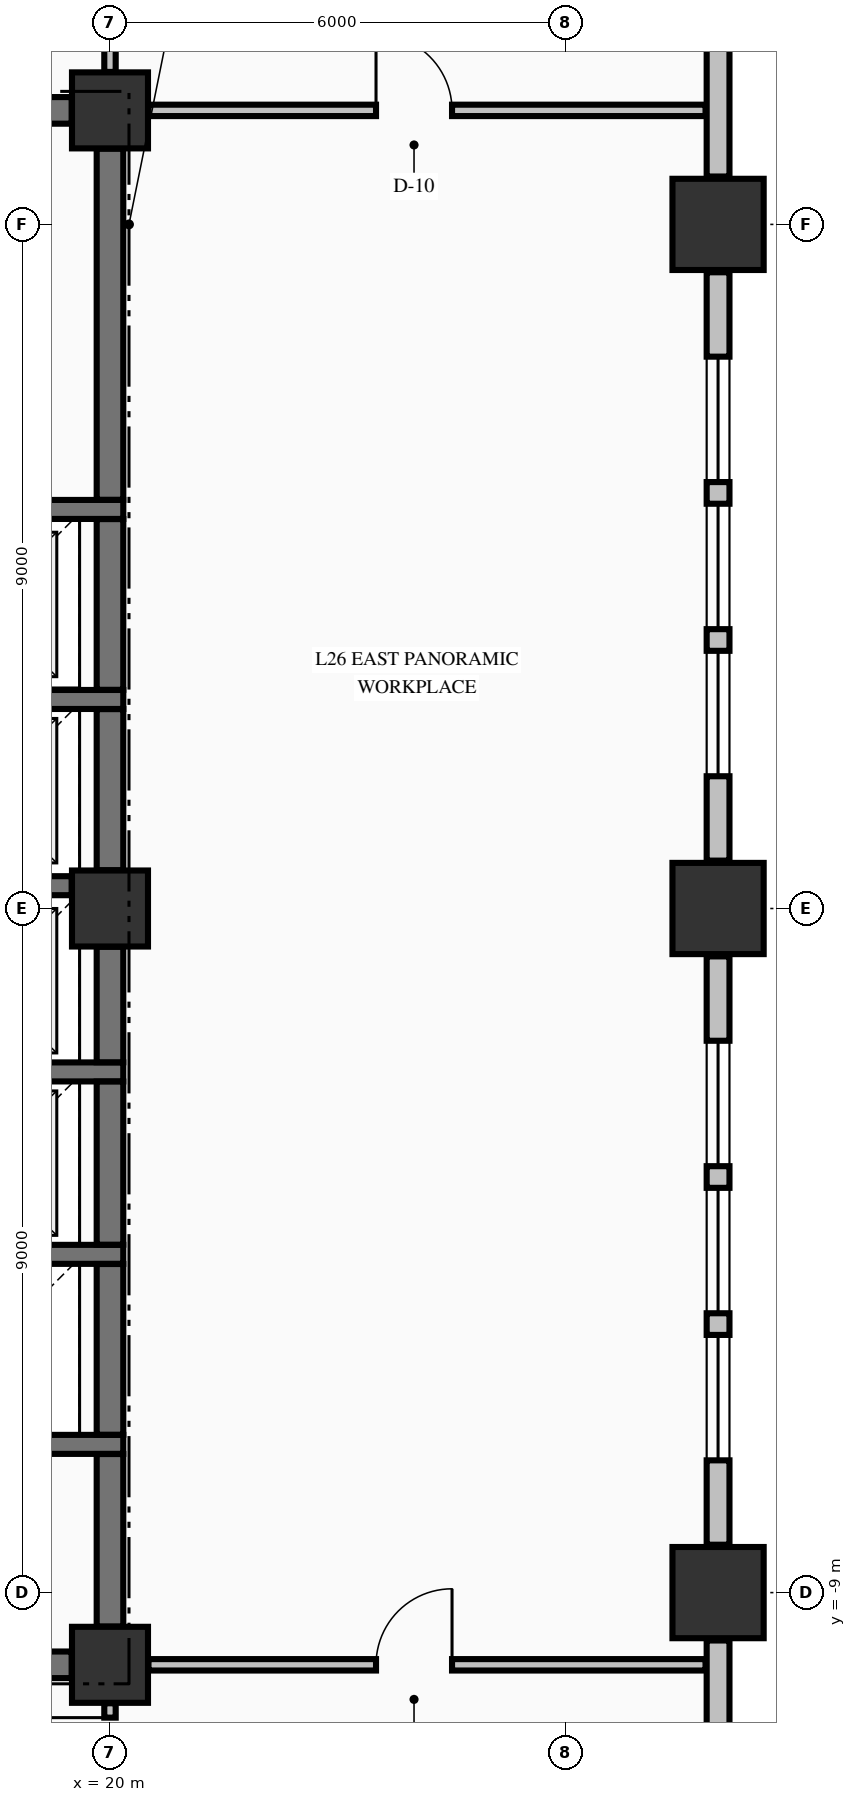
"""IFC4 building model, lengths in metres.
Left out: names, types, materials, properties, quantities, classifications, styles, units other than length and angle.
Written with IfcOpenShell. Run it as: python <this file> out.ifc"""

import sys

from ifc_helpers import new_model, si_unit, direction, frame, frame_2d, origin, origin_2d, place, context, subcontext, project, spatial, rectangle, extrude, element, fill, save


model = new_model("IFC4")
c1 = context("Model", 3, precision=1e-05, world=origin(), true_north=direction((0.0, 1.0)))
c2 = subcontext(c1, "Body", "Model", "MODEL_VIEW")
j1 = project(units=[si_unit("LENGTHUNIT", "METRE"), si_unit("PLANEANGLEUNIT", "RADIAN")], contexts=[c1])
p1 = place(None, origin())
s1 = spatial("IfcSite", under=j1, at=p1, CompositionType="ELEMENT")
p2 = place(p1, origin())
s2 = spatial("IfcBuilding", under=s1, at=p2, CompositionType="ELEMENT")
p3 = place(p2, frame((0.0, 0.0, 105.64)))
s3 = spatial("IfcBuildingStorey", under=s2, at=p3, CompositionType="ELEMENT", Elevation=105.64)
for number, where, z_axis, x_axis in (
    (1, (28.0, -9.0, -0.25), (0.0, 0.0, 1.0), (1.0, 0.0, 0.0)),
    (2, (28.0, 0.0, -0.25), (0.0, 0.0, 1.0), (1.0, 0.0, 0.0)),
    (3, (28.0, 9.0, -0.25), (0.0, 0.0, 1.0), (1.0, 0.0, 0.0)),
):
    element("IfcColumn", number, at=place(p3, frame(where, z_axis=z_axis, x_axis=x_axis)), inside=s3, PredefinedType="COLUMN", context=c2, shape_type="SweptSolid", body=[
        extrude(rectangle(XDim=1.2, YDim=1.2, at=origin_2d()), origin(), (0.0, 0.0, 1.0), 3.57),
    ])
for number, where, z_axis, x_axis in (
    (4, (20.0, -9.95, -0.25), (0.0, 0.0, 1.0), (1.0, 0.0, 0.0)),
    (5, (20.0, 10.5, -0.25), (0.0, 0.0, 1.0), (1.0, 0.0, 0.0)),
    (6, (20.0, 0.0, -0.25), (0.0, 0.0, 1.0), (1.0, 0.0, 0.0)),
):
    element("IfcColumn", number, at=place(p3, frame(where, z_axis=z_axis, x_axis=x_axis)), inside=s3, PredefinedType="COLUMN", context=c2, shape_type="SweptSolid", body=[
        extrude(rectangle(XDim=1.0, YDim=1.0, at=origin_2d()), origin(), (0.0, 0.0, 1.0), 3.57),
    ])
p4 = place(p3, frame((28.0, -20.37, 0.0), z_axis=(0.0, 0.0, 1.0), x_axis=(0.0, 1.0, 0.0)))
e7 = element("IfcWall", 7, at=p4, inside=s3, PredefinedType="STANDARD", context=c2, shape_type="SweptSolid", body=[
    extrude(rectangle(XDim=10.74, YDim=0.3, at=frame_2d((5.37, 0.0))), origin(), (0.0, 0.0, 1.0), 2.712),
])
p5 = place(p3, frame((28.0, -8.37, 0.0), z_axis=(0.0, 0.0, 1.0), x_axis=(0.0, 1.0, 0.0)))
e8 = element("IfcWall", 8, at=p5, inside=s3, PredefinedType="STANDARD", context=c2, shape_type="SweptSolid", body=[
    extrude(rectangle(XDim=7.74, YDim=0.3, at=frame_2d((3.87, 0.0))), origin(), (0.0, 0.0, 1.0), 2.712),
])
p6 = place(p5, frame((1.11, 0.0, 0.8)))
e9 = element("IfcOpeningElement", 9, at=p6, cuts=e8, PredefinedType="OPENING", context=c2, shape_type="SweptSolid", body=[
    extrude(rectangle(XDim=1.65, YDim=1.7, at=frame_2d((0.825, 0.85))), frame((0.0, 0.16, 0.0), z_axis=(0.0, -1.0, 0.0), x_axis=(1.0, 0.0, 0.0)), (0.0, 0.0, 1.0), 0.32),
])
p7 = place(p5, frame((3.045, 0.0, 0.8)))
e10 = element("IfcOpeningElement", 10, at=p7, cuts=e8, PredefinedType="OPENING", context=c2, shape_type="SweptSolid", body=[
    extrude(rectangle(XDim=1.65, YDim=1.7, at=frame_2d((0.825, 0.85))), frame((0.0, 0.16, 0.0), z_axis=(0.0, -1.0, 0.0), x_axis=(1.0, 0.0, 0.0)), (0.0, 0.0, 1.0), 0.32),
])
p8 = place(p5, frame((4.98, 0.0, 0.8)))
e11 = element("IfcOpeningElement", 11, at=p8, cuts=e8, PredefinedType="OPENING", context=c2, shape_type="SweptSolid", body=[
    extrude(rectangle(XDim=1.65, YDim=1.7, at=frame_2d((0.825, 0.85))), frame((0.0, 0.16, 0.0), z_axis=(0.0, -1.0, 0.0), x_axis=(1.0, 0.0, 0.0)), (0.0, 0.0, 1.0), 0.32),
])
p9 = place(p3, frame((28.0, 0.63, 0.0), z_axis=(0.0, 0.0, 1.0), x_axis=(0.0, 1.0, 0.0)))
e12 = element("IfcWall", 12, at=p9, inside=s3, PredefinedType="STANDARD", context=c2, shape_type="SweptSolid", body=[
    extrude(rectangle(XDim=7.74, YDim=0.3, at=frame_2d((3.87, 0.0))), origin(), (0.0, 0.0, 1.0), 2.712),
])
p10 = place(p9, frame((1.11, 0.0, 0.8)))
e13 = element("IfcOpeningElement", 13, at=p10, cuts=e12, PredefinedType="OPENING", context=c2, shape_type="SweptSolid", body=[
    extrude(rectangle(XDim=1.65, YDim=1.7, at=frame_2d((0.825, 0.85))), frame((0.0, 0.16, 0.0), z_axis=(0.0, -1.0, 0.0), x_axis=(1.0, 0.0, 0.0)), (0.0, 0.0, 1.0), 0.32),
])
p11 = place(p9, frame((3.045, 0.0, 0.8)))
e14 = element("IfcOpeningElement", 14, at=p11, cuts=e12, PredefinedType="OPENING", context=c2, shape_type="SweptSolid", body=[
    extrude(rectangle(XDim=1.65, YDim=1.7, at=frame_2d((0.825, 0.85))), frame((0.0, 0.16, 0.0), z_axis=(0.0, -1.0, 0.0), x_axis=(1.0, 0.0, 0.0)), (0.0, 0.0, 1.0), 0.32),
])
p12 = place(p9, frame((4.98, 0.0, 0.8)))
e15 = element("IfcOpeningElement", 15, at=p12, cuts=e12, PredefinedType="OPENING", context=c2, shape_type="SweptSolid", body=[
    extrude(rectangle(XDim=1.65, YDim=1.7, at=frame_2d((0.825, 0.85))), frame((0.0, 0.16, 0.0), z_axis=(0.0, -1.0, 0.0), x_axis=(1.0, 0.0, 0.0)), (0.0, 0.0, 1.0), 0.32),
])
p13 = place(p3, frame((28.0, 9.63, 0.0), z_axis=(0.0, 0.0, 1.0), x_axis=(0.0, 1.0, 0.0)))
e16 = element("IfcWall", 16, at=p13, inside=s3, PredefinedType="STANDARD", context=c2, shape_type="SweptSolid", body=[
    extrude(rectangle(XDim=10.74, YDim=0.3, at=frame_2d((5.37, 0.0))), origin(), (0.0, 0.0, 1.0), 2.712),
])
p14 = place(p3, frame((14.7, -9.95, 0.0), z_axis=(0.0, 0.0, 1.0), x_axis=(1.0, 0.0, 0.0)))
e17 = element("IfcWall", 17, at=p14, inside=s3, PredefinedType="SHEAR", context=c2, shape_type="SweptSolid", body=[
    extrude(rectangle(XDim=4.796, YDim=0.35, at=frame_2d((2.398, 0.0))), origin(), (0.0, 0.0, 1.0), 3.32),
])
p15 = place(p14, frame((0.65, 0.0, 0.0)))
e18 = element("IfcOpeningElement", 18, at=p15, cuts=e17, PredefinedType="OPENING", context=c2, shape_type="SweptSolid", body=[
    extrude(rectangle(XDim=1.2, YDim=2.15, at=frame_2d((0.6, 1.075))), frame((0.0, 0.185, 0.0), z_axis=(0.0, -1.0, 0.0), x_axis=(1.0, 0.0, 0.0)), (0.0, 0.0, 1.0), 0.37),
])
for number, where, z_axis, x_axis in (
    (19, (17.025, -7.05, 0.0), (0.0, 0.0, 1.0), (1.0, 0.0, 0.0)),
    (20, (17.025, -4.55, 0.0), (0.0, 0.0, 1.0), (1.0, 0.0, 0.0)),
    (21, (17.025, -2.15, 0.0), (0.0, 0.0, 1.0), (1.0, 0.0, 0.0)),
):
    element("IfcWall", number, at=place(p3, frame(where, z_axis=z_axis, x_axis=x_axis)), inside=s3, PredefinedType="SOLIDWALL", context=c2, shape_type="SweptSolid", body=[
        extrude(rectangle(XDim=3.15, YDim=0.25, at=frame_2d((1.575, 0.0))), origin(), (0.0, 0.0, 1.0), 3.32),
    ])
p16 = place(p3, frame((17.025, 0.3, 0.0), z_axis=(0.0, 0.0, 1.0), x_axis=(1.0, 0.0, 0.0)))
e22 = element("IfcWall", 22, at=p16, inside=s3, PredefinedType="SOLIDWALL", context=c2, shape_type="SweptSolid", body=[
    extrude(rectangle(XDim=2.471, YDim=0.25, at=frame_2d((1.236, 0.0))), origin(), (0.0, 0.0, 1.0), 3.32),
])
for number, where, z_axis, x_axis in (
    (23, (17.025, 2.75, 0.0), (0.0, 0.0, 1.0), (1.0, 0.0, 0.0)),
    (24, (17.025, 5.25, 0.0), (0.0, 0.0, 1.0), (1.0, 0.0, 0.0)),
):
    element("IfcWall", number, at=place(p3, frame(where, z_axis=z_axis, x_axis=x_axis)), inside=s3, PredefinedType="SOLIDWALL", context=c2, shape_type="SweptSolid", body=[
        extrude(rectangle(XDim=3.15, YDim=0.25, at=frame_2d((1.575, 0.0))), origin(), (0.0, 0.0, 1.0), 3.32),
    ])
p17 = place(p3, frame((14.7, 10.5, 0.0), z_axis=(0.0, 0.0, 1.0), x_axis=(1.0, 0.0, 0.0)))
e25 = element("IfcWall", 25, at=p17, inside=s3, PredefinedType="SHEAR", context=c2, shape_type="SweptSolid", body=[
    extrude(rectangle(XDim=4.796, YDim=0.35, at=frame_2d((2.398, 0.0))), origin(), (0.0, 0.0, 1.0), 3.32),
])
p18 = place(p17, frame((0.65, 0.0, 0.0)))
e26 = element("IfcOpeningElement", 26, at=p18, cuts=e25, PredefinedType="OPENING", context=c2, shape_type="SweptSolid", body=[
    extrude(rectangle(XDim=1.2, YDim=2.15, at=frame_2d((0.6, 1.075))), frame((0.0, 0.185, 0.0), z_axis=(0.0, -1.0, 0.0), x_axis=(1.0, 0.0, 0.0)), (0.0, 0.0, 1.0), 0.37),
])
p19 = place(p17, frame((3.25, 0.0, 0.0)))
e27 = element("IfcOpeningElement", 27, at=p19, cuts=e25, PredefinedType="OPENING", context=c2, shape_type="SweptSolid", body=[
    extrude(rectangle(XDim=0.9, YDim=2.15, at=frame_2d((0.45, 1.075))), frame((0.0, 0.185, 0.0), z_axis=(0.0, -1.0, 0.0), x_axis=(1.0, 0.0, 0.0)), (0.0, 0.0, 1.0), 0.37),
])
p20 = place(p3, frame((20.506, -9.95, 0.0), z_axis=(0.0, 0.0, 1.0), x_axis=(1.0, 0.0, 0.0)))
e28 = element("IfcWall", 28, at=p20, inside=s3, PredefinedType="PARTITIONING", context=c2, shape_type="SweptSolid", body=[
    extrude(rectangle(XDim=7.329, YDim=0.15, at=frame_2d((3.665, 0.0))), origin(), (0.0, 0.0, 1.0), 3.32),
])
p21 = place(p20, frame((2.994, 0.0, 0.0)))
e29 = element("IfcOpeningElement", 29, at=p21, cuts=e28, PredefinedType="OPENING", context=c2, shape_type="SweptSolid", body=[
    extrude(rectangle(XDim=1.0, YDim=2.15, at=frame_2d((0.5, 1.075))), frame((0.0, 0.085, 0.0), z_axis=(0.0, -1.0, 0.0), x_axis=(1.0, 0.0, 0.0)), (0.0, 0.0, 1.0), 0.17),
])
p22 = place(p3, frame((20.506, 10.5, 0.0), z_axis=(0.0, 0.0, 1.0), x_axis=(1.0, 0.0, 0.0)))
e30 = element("IfcWall", 30, at=p22, inside=s3, PredefinedType="PARTITIONING", context=c2, shape_type="SweptSolid", body=[
    extrude(rectangle(XDim=7.329, YDim=0.15, at=frame_2d((3.665, 0.0))), origin(), (0.0, 0.0, 1.0), 3.32),
])
p23 = place(p22, frame((2.994, 0.0, 0.0)))
e31 = element("IfcOpeningElement", 31, at=p23, cuts=e30, PredefinedType="OPENING", context=c2, shape_type="SweptSolid", body=[
    extrude(rectangle(XDim=1.0, YDim=2.15, at=frame_2d((0.5, 1.075))), frame((0.0, 0.085, 0.0), z_axis=(0.0, -1.0, 0.0), x_axis=(1.0, 0.0, 0.0)), (0.0, 0.0, 1.0), 0.17),
])
p24 = place(p3, frame((20.0, -9.446, 0.0), z_axis=(0.0, 0.0, 1.0), x_axis=(0.0, 1.0, 0.0)))
e32 = element("IfcWall", 32, at=p24, inside=s3, PredefinedType="SHEAR", context=c2, shape_type="SweptSolid", body=[
    extrude(rectangle(XDim=2.269, YDim=0.35, at=frame_2d((1.135, 0.0))), origin(), (0.0, 0.0, 1.0), 3.32),
])
p25 = place(p3, frame((20.0, -6.923, 0.0), z_axis=(0.0, 0.0, 1.0), x_axis=(0.0, 1.0, 0.0)))
e33 = element("IfcWall", 33, at=p25, inside=s3, PredefinedType="SHEAR", context=c2, shape_type="SweptSolid", body=[
    extrude(rectangle(XDim=2.246, YDim=0.35, at=frame_2d((1.123, 0.0))), origin(), (0.0, 0.0, 1.0), 3.32),
])
p26 = place(p3, frame((20.0, -4.423, 0.0), z_axis=(0.0, 0.0, 1.0), x_axis=(0.0, 1.0, 0.0)))
e34 = element("IfcWall", 34, at=p26, inside=s3, PredefinedType="SHEAR", context=c2, shape_type="SweptSolid", body=[
    extrude(rectangle(XDim=2.146, YDim=0.35, at=frame_2d((1.073, 0.0))), origin(), (0.0, 0.0, 1.0), 3.32),
])
p27 = place(p3, frame((20.0, -2.023, 0.0), z_axis=(0.0, 0.0, 1.0), x_axis=(0.0, 1.0, 0.0)))
e35 = element("IfcWall", 35, at=p27, inside=s3, PredefinedType="SHEAR", context=c2, shape_type="SweptSolid", body=[
    extrude(rectangle(XDim=1.519, YDim=0.35, at=frame_2d((0.76, 0.0))), origin(), (0.0, 0.0, 1.0), 3.32),
])
p28 = place(p3, frame((20.0, 0.504, 0.0), z_axis=(0.0, 0.0, 1.0), x_axis=(0.0, 1.0, 0.0)))
e36 = element("IfcWall", 36, at=p28, inside=s3, PredefinedType="SHEAR", context=c2, shape_type="SweptSolid", body=[
    extrude(rectangle(XDim=2.119, YDim=0.35, at=frame_2d((1.06, 0.0))), origin(), (0.0, 0.0, 1.0), 3.32),
])
p29 = place(p3, frame((20.0, 2.877, 0.0), z_axis=(0.0, 0.0, 1.0), x_axis=(0.0, 1.0, 0.0)))
e37 = element("IfcWall", 37, at=p29, inside=s3, PredefinedType="SHEAR", context=c2, shape_type="SweptSolid", body=[
    extrude(rectangle(XDim=2.246, YDim=0.35, at=frame_2d((1.123, 0.0))), origin(), (0.0, 0.0, 1.0), 3.32),
])
p30 = place(p3, frame((20.0, 5.377, 0.0), z_axis=(0.0, 0.0, 1.0), x_axis=(0.0, 1.0, 0.0)))
e38 = element("IfcWall", 38, at=p30, inside=s3, PredefinedType="SHEAR", context=c2, shape_type="SweptSolid", body=[
    extrude(rectangle(XDim=4.619, YDim=0.35, at=frame_2d((2.31, 0.0))), origin(), (0.0, 0.0, 1.0), 3.32),
])
p31 = place(p3, frame((20.0, -12.222, 0.0), z_axis=(0.0, 0.0, 1.0), x_axis=(0.0, 1.0, 0.0)))
e39 = element("IfcWall", 39, at=p31, inside=s3, PredefinedType="PARTITIONING", context=c2, shape_type="SweptSolid", body=[
    extrude(rectangle(XDim=1.766, YDim=0.15, at=frame_2d((0.883, 0.0))), origin(), (0.0, 0.0, 1.0), 2.81),
])
p32 = place(p31, frame((0.627, 0.0, 0.0)))
e40 = element("IfcOpeningElement", 40, at=p32, cuts=e39, PredefinedType="OPENING", context=c2, shape_type="SweptSolid", body=[
    extrude(rectangle(XDim=0.95, YDim=2.15, at=frame_2d((0.475, 1.075))), frame((0.0, 0.085, 0.0), z_axis=(0.0, -1.0, 0.0), x_axis=(1.0, 0.0, 0.0)), (0.0, 0.0, 1.0), 0.17),
])
p33 = place(p3, frame((20.0, 11.006, 0.0), z_axis=(0.0, 0.0, 1.0), x_axis=(0.0, 1.0, 0.0)))
e41 = element("IfcWall", 41, at=p33, inside=s3, PredefinedType="PARTITIONING", context=c2, shape_type="SweptSolid", body=[
    extrude(rectangle(XDim=2.066, YDim=0.15, at=frame_2d((1.033, 0.0))), origin(), (0.0, 0.0, 1.0), 2.81),
])
p34 = place(p33, frame((0.339, 0.0, 0.0)))
e42 = element("IfcOpeningElement", 42, at=p34, cuts=e41, PredefinedType="OPENING", context=c2, shape_type="SweptSolid", body=[
    extrude(rectangle(XDim=0.95, YDim=2.15, at=frame_2d((0.475, 1.075))), frame((0.0, 0.085, 0.0), z_axis=(0.0, -1.0, 0.0), x_axis=(1.0, 0.0, 0.0)), (0.0, 0.0, 1.0), 0.17),
])
p35 = place(p6, origin())
e43 = element("IfcWindow", 43, at=p35, inside=s3, PartitioningType="SINGLE_PANEL", PredefinedType="WINDOW", context=c2, shape_type="SweptSolid", body=[
    extrude(rectangle(XDim=1.65, YDim=1.7, at=frame_2d((0.825, 0.85))), frame((0.0, 0.03, 0.0), z_axis=(0.0, -1.0, 0.0), x_axis=(1.0, 0.0, 0.0)), (0.0, 0.0, 1.0), 0.06),
])
fill(e9, e43)
p36 = place(p7, origin())
e44 = element("IfcWindow", 44, at=p36, inside=s3, PartitioningType="SINGLE_PANEL", PredefinedType="WINDOW", context=c2, shape_type="SweptSolid", body=[
    extrude(rectangle(XDim=1.65, YDim=1.7, at=frame_2d((0.825, 0.85))), frame((0.0, 0.03, 0.0), z_axis=(0.0, -1.0, 0.0), x_axis=(1.0, 0.0, 0.0)), (0.0, 0.0, 1.0), 0.06),
])
fill(e10, e44)
p37 = place(p8, origin())
e45 = element("IfcWindow", 45, at=p37, inside=s3, PartitioningType="SINGLE_PANEL", PredefinedType="WINDOW", context=c2, shape_type="SweptSolid", body=[
    extrude(rectangle(XDim=1.65, YDim=1.7, at=frame_2d((0.825, 0.85))), frame((0.0, 0.03, 0.0), z_axis=(0.0, -1.0, 0.0), x_axis=(1.0, 0.0, 0.0)), (0.0, 0.0, 1.0), 0.06),
])
fill(e11, e45)
p38 = place(p10, origin())
e46 = element("IfcWindow", 46, at=p38, inside=s3, PartitioningType="SINGLE_PANEL", PredefinedType="WINDOW", context=c2, shape_type="SweptSolid", body=[
    extrude(rectangle(XDim=1.65, YDim=1.7, at=frame_2d((0.825, 0.85))), frame((0.0, 0.03, 0.0), z_axis=(0.0, -1.0, 0.0), x_axis=(1.0, 0.0, 0.0)), (0.0, 0.0, 1.0), 0.06),
])
fill(e13, e46)
p39 = place(p11, origin())
e47 = element("IfcWindow", 47, at=p39, inside=s3, PartitioningType="SINGLE_PANEL", PredefinedType="WINDOW", context=c2, shape_type="SweptSolid", body=[
    extrude(rectangle(XDim=1.65, YDim=1.7, at=frame_2d((0.825, 0.85))), frame((0.0, 0.03, 0.0), z_axis=(0.0, -1.0, 0.0), x_axis=(1.0, 0.0, 0.0)), (0.0, 0.0, 1.0), 0.06),
])
fill(e14, e47)
p40 = place(p12, origin())
e48 = element("IfcWindow", 48, at=p40, inside=s3, PartitioningType="SINGLE_PANEL", PredefinedType="WINDOW", context=c2, shape_type="SweptSolid", body=[
    extrude(rectangle(XDim=1.65, YDim=1.7, at=frame_2d((0.825, 0.85))), frame((0.0, 0.03, 0.0), z_axis=(0.0, -1.0, 0.0), x_axis=(1.0, 0.0, 0.0)), (0.0, 0.0, 1.0), 0.06),
])
fill(e15, e48)
p41 = place(p32, origin())
e49 = element("IfcDoor", 49, at=p41, inside=s3, OperationType="SINGLE_SWING_RIGHT", PredefinedType="DOOR", context=c2, shape_type="SweptSolid", body=[
    extrude(rectangle(XDim=0.95, YDim=2.15, at=frame_2d((0.475, 1.075))), frame((0.0, 0.025, 0.0), z_axis=(0.0, -1.0, 0.0), x_axis=(1.0, 0.0, 0.0)), (0.0, 0.0, 1.0), 0.05),
])
fill(e40, e49)
p42 = place(p23, origin())
e50 = element("IfcDoor", 50, at=p42, inside=s3, OperationType="SINGLE_SWING_LEFT", PredefinedType="DOOR", context=c2, shape_type="SweptSolid", body=[
    extrude(rectangle(XDim=1.0, YDim=2.15, at=frame_2d((0.5, 1.075))), frame((0.0, 0.025, 0.0), z_axis=(0.0, -1.0, 0.0), x_axis=(1.0, 0.0, 0.0)), (0.0, 0.0, 1.0), 0.05),
])
fill(e31, e50)
p43 = place(p21, origin())
e51 = element("IfcDoor", 51, at=p43, inside=s3, OperationType="SINGLE_SWING_RIGHT", PredefinedType="DOOR", context=c2, shape_type="SweptSolid", body=[
    extrude(rectangle(XDim=1.0, YDim=2.15, at=frame_2d((0.5, 1.075))), frame((0.0, 0.025, 0.0), z_axis=(0.0, -1.0, 0.0), x_axis=(1.0, 0.0, 0.0)), (0.0, 0.0, 1.0), 0.05),
])
fill(e29, e51)
save(model, sys.argv[1])
